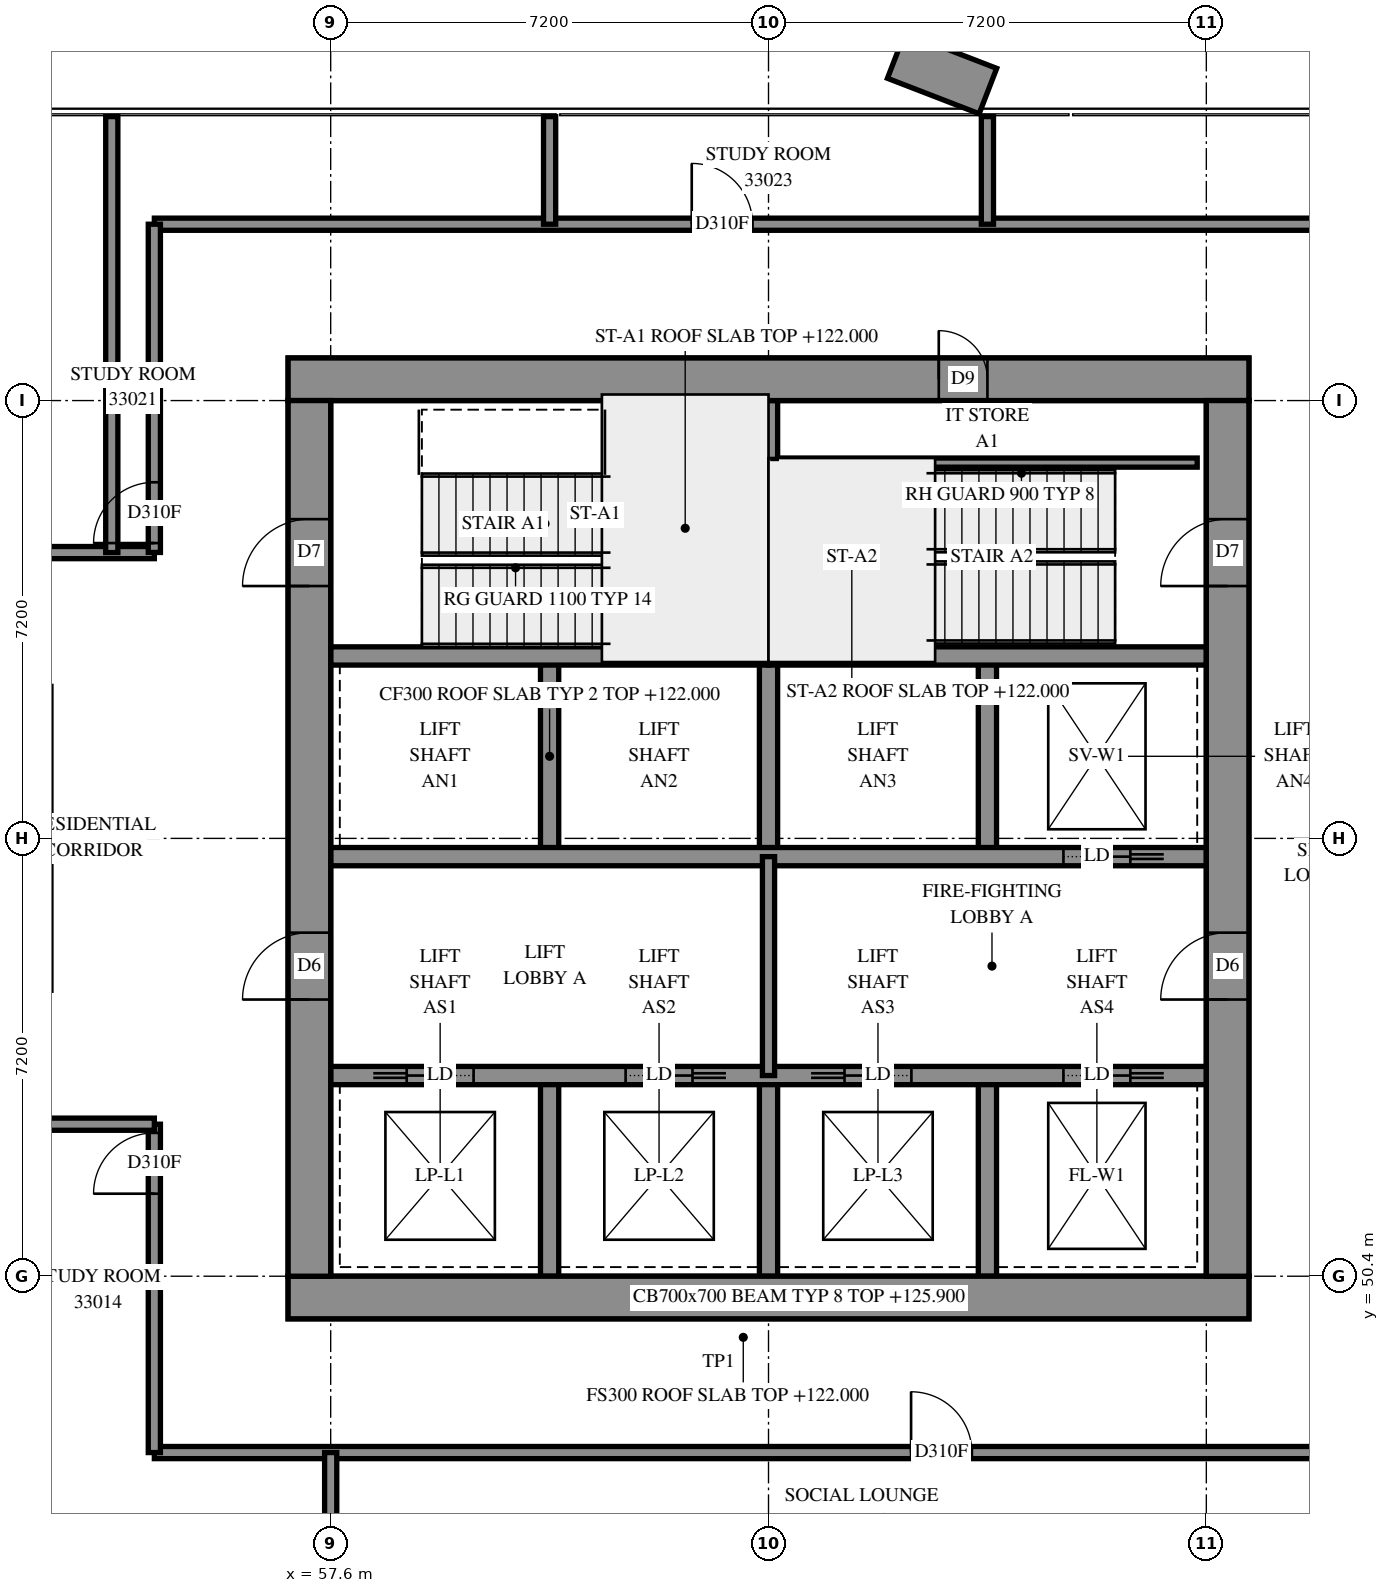
"""IFC4 building model, lengths in metres.
Left out: names, types, materials, properties, quantities, classifications, styles, units other than length and angle.
Written with IfcOpenShell. Run it as: python <this file> out.ifc"""

import sys

from ifc_helpers import new_model, si_unit, direction, frame, frame_2d, origin, place, context, subcontext, project, spatial, rectangle, extrude, element, fill, save


model = new_model("IFC4")
c1 = context("Model", 3, precision=1e-05, world=origin(), true_north=direction((0.0, 1.0)))
c2 = subcontext(c1, "Body", "Model", "MODEL_VIEW")
j1 = project(units=[si_unit("LENGTHUNIT", "METRE"), si_unit("PLANEANGLEUNIT", "RADIAN")], contexts=[c1])
p1 = place(None, origin())
s1 = spatial("IfcSite", under=j1, at=p1, CompositionType="ELEMENT")
p2 = place(p1, origin())
s2 = spatial("IfcBuilding", under=s1, at=p2, CompositionType="ELEMENT")
p3 = place(p2, frame((0.0, 0.0, 122.0)))
s3 = spatial("IfcBuildingStorey", under=s2, at=p3, CompositionType="ELEMENT", Elevation=122.0)
p4 = place(p3, frame((56.9, 50.05, -0.3), z_axis=(0.0, 0.0, 1.0), x_axis=(1.0, 0.0, 0.0)))
e1 = element("IfcWall", 1, at=p4, inside=s3, PredefinedType="SHEAR", context=c2, shape_type="SweptSolid", body=[
    extrude(rectangle(XDim=15.8, YDim=0.7, at=frame_2d((7.9, 0.0))), origin(), (0.0, 0.0, 1.0), 3.5),
])
p5 = place(p3, frame((56.9, 65.15, -0.3), z_axis=(0.0, 0.0, 1.0), x_axis=(1.0, 0.0, 0.0)))
e2 = element("IfcWall", 2, at=p5, inside=s3, PredefinedType="SHEAR", context=c2, shape_type="SweptSolid", body=[
    extrude(rectangle(XDim=15.8, YDim=0.7, at=frame_2d((7.9, 0.0))), origin(), (0.0, 0.0, 1.0), 3.5),
])
p6 = place(p5, frame((10.7, 0.0, 0.3)))
e3 = element("IfcOpeningElement", 3, at=p6, cuts=e2, PredefinedType="OPENING", context=c2, shape_type="SweptSolid", body=[
    extrude(rectangle(XDim=0.8, YDim=2.1, at=frame_2d((0.4, 1.05))), frame((0.0, 0.36, 0.0), z_axis=(0.0, -1.0, 0.0), x_axis=(1.0, 0.0, 0.0)), (0.0, 0.0, 1.0), 0.72),
])
p7 = place(p3, frame((57.25, 50.4, -0.3), z_axis=(0.0, 0.0, 1.0), x_axis=(0.0, 1.0, 0.0)))
e4 = element("IfcWall", 4, at=p7, inside=s3, PredefinedType="SHEAR", context=c2, shape_type="SweptSolid", body=[
    extrude(rectangle(XDim=14.4, YDim=0.7, at=frame_2d((7.2, 0.0))), origin(), (0.0, 0.0, 1.0), 3.5),
])
p8 = place(p7, frame((4.55, 0.0, 0.3)))
e5 = element("IfcOpeningElement", 5, at=p8, cuts=e4, PredefinedType="OPENING", context=c2, shape_type="SweptSolid", body=[
    extrude(rectangle(XDim=1.1, YDim=2.1, at=frame_2d((0.55, 1.05))), frame((0.0, 0.36, 0.0), z_axis=(0.0, -1.0, 0.0), x_axis=(1.0, 0.0, 0.0)), (0.0, 0.0, 1.0), 0.72),
])
p9 = place(p7, frame((11.35, 0.0, 0.3)))
e6 = element("IfcOpeningElement", 6, at=p9, cuts=e4, PredefinedType="OPENING", context=c2, shape_type="SweptSolid", body=[
    extrude(rectangle(XDim=1.1, YDim=2.1, at=frame_2d((0.55, 1.05))), frame((0.0, 0.36, 0.0), z_axis=(0.0, -1.0, 0.0), x_axis=(1.0, 0.0, 0.0)), (0.0, 0.0, 1.0), 0.72),
])
p10 = place(p3, frame((72.35, 50.4, -0.3), z_axis=(0.0, 0.0, 1.0), x_axis=(0.0, 1.0, 0.0)))
e7 = element("IfcWall", 7, at=p10, inside=s3, PredefinedType="SHEAR", context=c2, shape_type="SweptSolid", body=[
    extrude(rectangle(XDim=14.4, YDim=0.7, at=frame_2d((7.2, 0.0))), origin(), (0.0, 0.0, 1.0), 3.5),
])
p11 = place(p10, frame((4.55, 0.0, 0.3)))
e8 = element("IfcOpeningElement", 8, at=p11, cuts=e7, PredefinedType="OPENING", context=c2, shape_type="SweptSolid", body=[
    extrude(rectangle(XDim=1.1, YDim=2.1, at=frame_2d((0.55, 1.05))), frame((0.0, 0.36, 0.0), z_axis=(0.0, -1.0, 0.0), x_axis=(1.0, 0.0, 0.0)), (0.0, 0.0, 1.0), 0.72),
])
p12 = place(p10, frame((11.35, 0.0, 0.3)))
e9 = element("IfcOpeningElement", 9, at=p12, cuts=e7, PredefinedType="OPENING", context=c2, shape_type="SweptSolid", body=[
    extrude(rectangle(XDim=1.1, YDim=2.1, at=frame_2d((0.55, 1.05))), frame((0.0, 0.36, 0.0), z_axis=(0.0, -1.0, 0.0), x_axis=(1.0, 0.0, 0.0)), (0.0, 0.0, 1.0), 0.72),
])
for number, where, z_axis, x_axis in (
    (10, (61.2, 50.4, 0.0), (0.0, 0.0, 1.0), (0.0, 1.0, 0.0)),
    (11, (61.2, 57.3, 0.0), (0.0, 0.0, 1.0), (0.0, 1.0, 0.0)),
    (12, (64.8, 50.4, 0.0), (0.0, 0.0, 1.0), (0.0, 1.0, 0.0)),
    (13, (64.8, 57.3, 0.0), (0.0, 0.0, 1.0), (0.0, 1.0, 0.0)),
    (14, (68.4, 50.4, 0.0), (0.0, 0.0, 1.0), (0.0, 1.0, 0.0)),
    (15, (68.4, 57.3, 0.0), (0.0, 0.0, 1.0), (0.0, 1.0, 0.0)),
):
    element("IfcWall", number, at=place(p3, frame(where, z_axis=z_axis, x_axis=x_axis)), inside=s3, PredefinedType="SOLIDWALL", context=c2, shape_type="SweptSolid", body=[
        extrude(rectangle(XDim=3.3, YDim=0.3, at=frame_2d((1.65, 0.0))), origin(), (0.0, 0.0, 1.0), 3.9),
    ])
p13 = place(p3, frame((57.6, 53.7, 0.0), z_axis=(0.0, 0.0, 1.0), x_axis=(1.0, 0.0, 0.0)))
e16 = element("IfcWall", 16, at=p13, inside=s3, PredefinedType="SOLIDWALL", context=c2, shape_type="SweptSolid", body=[
    extrude(rectangle(XDim=14.4, YDim=0.3, at=frame_2d((7.2, 0.0))), origin(), (0.0, 0.0, 1.0), 3.9),
])
p14 = place(p13, frame((1.25, 0.0, 0.0)))
e17 = element("IfcOpeningElement", 17, at=p14, cuts=e16, PredefinedType="OPENING", context=c2, shape_type="SweptSolid", body=[
    extrude(rectangle(XDim=1.1, YDim=2.1, at=frame_2d((0.55, 1.05))), frame((0.0, 0.16, 0.0), z_axis=(0.0, -1.0, 0.0), x_axis=(1.0, 0.0, 0.0)), (0.0, 0.0, 1.0), 0.32),
])
p15 = place(p13, frame((4.85, 0.0, 0.0)))
e18 = element("IfcOpeningElement", 18, at=p15, cuts=e16, PredefinedType="OPENING", context=c2, shape_type="SweptSolid", body=[
    extrude(rectangle(XDim=1.1, YDim=2.1, at=frame_2d((0.55, 1.05))), frame((0.0, 0.16, 0.0), z_axis=(0.0, -1.0, 0.0), x_axis=(1.0, 0.0, 0.0)), (0.0, 0.0, 1.0), 0.32),
])
p16 = place(p13, frame((8.45, 0.0, 0.0)))
e19 = element("IfcOpeningElement", 19, at=p16, cuts=e16, PredefinedType="OPENING", context=c2, shape_type="SweptSolid", body=[
    extrude(rectangle(XDim=1.1, YDim=2.1, at=frame_2d((0.55, 1.05))), frame((0.0, 0.16, 0.0), z_axis=(0.0, -1.0, 0.0), x_axis=(1.0, 0.0, 0.0)), (0.0, 0.0, 1.0), 0.32),
])
p17 = place(p13, frame((12.05, 0.0, 0.0)))
e20 = element("IfcOpeningElement", 20, at=p17, cuts=e16, PredefinedType="OPENING", context=c2, shape_type="SweptSolid", body=[
    extrude(rectangle(XDim=1.1, YDim=2.1, at=frame_2d((0.55, 1.05))), frame((0.0, 0.16, 0.0), z_axis=(0.0, -1.0, 0.0), x_axis=(1.0, 0.0, 0.0)), (0.0, 0.0, 1.0), 0.32),
])
p18 = place(p3, frame((57.6, 57.3, 0.0), z_axis=(0.0, 0.0, 1.0), x_axis=(1.0, 0.0, 0.0)))
e21 = element("IfcWall", 21, at=p18, inside=s3, PredefinedType="SOLIDWALL", context=c2, shape_type="SweptSolid", body=[
    extrude(rectangle(XDim=14.4, YDim=0.3, at=frame_2d((7.2, 0.0))), origin(), (0.0, 0.0, 1.0), 3.9),
])
p19 = place(p18, frame((12.05, 0.0, 0.0)))
e22 = element("IfcOpeningElement", 22, at=p19, cuts=e21, PredefinedType="OPENING", context=c2, shape_type="SweptSolid", body=[
    extrude(rectangle(XDim=1.1, YDim=2.1, at=frame_2d((0.55, 1.05))), frame((0.0, 0.16, 0.0), z_axis=(0.0, -1.0, 0.0), x_axis=(1.0, 0.0, 0.0)), (0.0, 0.0, 1.0), 0.32),
])
for number, where, z_axis, x_axis in (
    (23, (57.6, 60.6, 0.0), (0.0, 0.0, 1.0), (1.0, 0.0, 0.0)),
    (24, (64.8, 60.6, 0.0), (0.0, 0.0, 1.0), (1.0, 0.0, 0.0)),
):
    element("IfcWall", number, at=place(p3, frame(where, z_axis=z_axis, x_axis=x_axis)), inside=s3, PredefinedType="SOLIDWALL", context=c2, shape_type="SweptSolid", body=[
        extrude(rectangle(XDim=7.2, YDim=0.3, at=frame_2d((3.6, 0.0))), origin(), (0.0, 0.0, 1.0), 3.9),
    ])
p20 = place(p3, frame((64.8, 60.6, 0.0), z_axis=(0.0, 0.0, 1.0), x_axis=(0.0, 1.0, 0.0)))
e25 = element("IfcWall", 25, at=p20, inside=s3, PredefinedType="SOLIDWALL", context=c2, shape_type="SweptSolid", body=[
    extrude(rectangle(XDim=4.2, YDim=0.3, at=frame_2d((2.1, 0.0))), origin(), (0.0, 0.0, 1.0), 3.9),
])
p21 = place(p3, frame((68.408, 69.89, 0.0), z_axis=(0.0, 0.0, 1.0), x_axis=(-0.9327962444, 0.3604041708, 0.0)))
e26 = element("IfcWall", 26, at=p21, inside=s3, PredefinedType="SOLIDWALL", context=c2, shape_type="SweptSolid", body=[
    extrude(rectangle(XDim=1.617, YDim=0.8, at=frame_2d((0.808, 0.0))), origin(), (0.0, 0.0, 1.0), 0.65),
])
p22 = place(p3, frame((64.95, 63.78, 0.0), z_axis=(0.0, 0.0, 1.0), x_axis=(1.0, 0.0, 0.0)))
e27 = element("IfcWall", 27, at=p22, inside=s3, PredefinedType="PARTITIONING", context=c2, shape_type="SweptSolid", body=[
    extrude(rectangle(XDim=6.9, YDim=0.15, at=frame_2d((3.45, 0.0))), origin(), (0.0, 0.0, 1.0), 3.9),
])
p23 = place(p3, frame((64.8, 53.7, 0.0), z_axis=(0.0, 0.0, 1.0), x_axis=(0.0, 1.0, 0.0)))
e28 = element("IfcWall", 28, at=p23, inside=s3, PredefinedType="PARTITIONING", context=c2, shape_type="SweptSolid", body=[
    extrude(rectangle(XDim=3.6, YDim=0.2, at=frame_2d((1.8, 0.0))), origin(), (0.0, 0.0, 1.0), 3.9),
])
p24 = place(p3, frame((33.502, 62.3, 0.0), z_axis=(0.0, 0.0, 1.0), x_axis=(1.0, 0.0, 0.0)))
e29 = element("IfcWall", 29, at=p24, inside=s3, PredefinedType="PARTITIONING", context=c2, shape_type="SweptSolid", body=[
    extrude(rectangle(XDim=21.198, YDim=0.2, at=frame_2d((10.599, 0.0))), origin(), (0.0, 0.0, 1.0), 3.9),
])
p25 = place(p24, frame((6.056, 0.0, 0.0)))
e30 = element("IfcOpeningElement", 30, at=p25, cuts=e29, PredefinedType="OPENING", context=c2, shape_type="SweptSolid", body=[
    extrude(rectangle(XDim=1.0, YDim=2.1, at=frame_2d((0.5, 1.05))), frame((0.0, 0.11, 0.0), z_axis=(0.0, -1.0, 0.0), x_axis=(1.0, 0.0, 0.0)), (0.0, 0.0, 1.0), 0.22),
])
p26 = place(p24, frame((11.463, 0.0, 0.0)))
e31 = element("IfcOpeningElement", 31, at=p26, cuts=e29, PredefinedType="OPENING", context=c2, shape_type="SweptSolid", body=[
    extrude(rectangle(XDim=1.0, YDim=2.1, at=frame_2d((0.5, 1.05))), frame((0.0, 0.11, 0.0), z_axis=(0.0, -1.0, 0.0), x_axis=(1.0, 0.0, 0.0)), (0.0, 0.0, 1.0), 0.22),
])
p27 = place(p24, frame((15.636, 0.0, 0.0)))
e32 = element("IfcOpeningElement", 32, at=p27, cuts=e29, PredefinedType="OPENING", context=c2, shape_type="SweptSolid", body=[
    extrude(rectangle(XDim=1.0, YDim=2.1, at=frame_2d((0.5, 1.05))), frame((0.0, 0.11, 0.0), z_axis=(0.0, -1.0, 0.0), x_axis=(1.0, 0.0, 0.0)), (0.0, 0.0, 1.0), 0.22),
])
p28 = place(p3, frame((54.7, 67.7, 0.0), z_axis=(0.0, 0.0, 1.0), x_axis=(1.0, 0.0, 0.0)))
e33 = element("IfcWall", 33, at=p28, inside=s3, PredefinedType="PARTITIONING", context=c2, shape_type="SweptSolid", body=[
    extrude(rectangle(XDim=20.2, YDim=0.2, at=frame_2d((10.1, 0.0))), origin(), (0.0, 0.0, 1.0), 3.9),
])
p29 = place(p28, frame((8.838, 0.0, 0.0)))
e34 = element("IfcOpeningElement", 34, at=p29, cuts=e33, PredefinedType="OPENING", context=c2, shape_type="SweptSolid", body=[
    extrude(rectangle(XDim=1.0, YDim=2.1, at=frame_2d((0.5, 1.05))), frame((0.0, 0.11, 0.0), z_axis=(0.0, -1.0, 0.0), x_axis=(1.0, 0.0, 0.0)), (0.0, 0.0, 1.0), 0.22),
])
p30 = place(p3, frame((54.7, 47.5, 0.0), z_axis=(0.0, 0.0, 1.0), x_axis=(1.0, 0.0, 0.0)))
e35 = element("IfcWall", 35, at=p30, inside=s3, PredefinedType="PARTITIONING", context=c2, shape_type="SweptSolid", body=[
    extrude(rectangle(XDim=19.442, YDim=0.2, at=frame_2d((9.721, 0.0))), origin(), (0.0, 0.0, 1.0), 3.9),
])
p31 = place(p30, frame((12.444, 0.0, 0.0)))
e36 = element("IfcOpeningElement", 36, at=p31, cuts=e35, PredefinedType="OPENING", context=c2, shape_type="SweptSolid", body=[
    extrude(rectangle(XDim=1.0, YDim=2.1, at=frame_2d((0.5, 1.05))), frame((0.0, 0.11, 0.0), z_axis=(0.0, -1.0, 0.0), x_axis=(1.0, 0.0, 0.0)), (0.0, 0.0, 1.0), 0.22),
])
p32 = place(p3, frame((54.0, 62.3, 0.0), z_axis=(0.0, 0.0, 1.0), x_axis=(0.0, 1.0, 0.0)))
e37 = element("IfcWall", 37, at=p32, inside=s3, PredefinedType="PARTITIONING", context=c2, shape_type="SweptSolid", body=[
    extrude(rectangle(XDim=7.17, YDim=0.2, at=frame_2d((3.585, 0.0))), origin(), (0.0, 0.0, 1.0), 3.9),
])
p33 = place(p3, frame((54.7, 47.5, 0.0), z_axis=(0.0, 0.0, 1.0), x_axis=(0.0, 1.0, 0.0)))
e38 = element("IfcWall", 38, at=p33, inside=s3, PredefinedType="PARTITIONING", context=c2, shape_type="SweptSolid", body=[
    extrude(rectangle(XDim=5.4, YDim=0.2, at=frame_2d((2.7, 0.0))), origin(), (0.0, 0.0, 1.0), 3.9),
])
p34 = place(p33, frame((4.257, 0.0, 0.0)))
e39 = element("IfcOpeningElement", 39, at=p34, cuts=e38, PredefinedType="OPENING", context=c2, shape_type="SweptSolid", body=[
    extrude(rectangle(XDim=1.0, YDim=2.1, at=frame_2d((0.5, 1.05))), frame((0.0, 0.11, 0.0), z_axis=(0.0, -1.0, 0.0), x_axis=(1.0, 0.0, 0.0)), (0.0, 0.0, 1.0), 0.22),
])
p35 = place(p3, frame((54.7, 62.302, 0.0), z_axis=(0.0, 0.0, 1.0), x_axis=(0.0, 1.0, 0.0)))
e40 = element("IfcWall", 40, at=p35, inside=s3, PredefinedType="PARTITIONING", context=c2, shape_type="SweptSolid", body=[
    extrude(rectangle(XDim=5.398, YDim=0.2, at=frame_2d((2.699, 0.0))), origin(), (0.0, 0.0, 1.0), 3.9),
])
p36 = place(p35, frame((0.154, 0.0, 0.0)))
e41 = element("IfcOpeningElement", 41, at=p36, cuts=e40, PredefinedType="OPENING", context=c2, shape_type="SweptSolid", body=[
    extrude(rectangle(XDim=1.0, YDim=2.1, at=frame_2d((0.5, 1.05))), frame((0.0, 0.11, 0.0), z_axis=(0.0, -1.0, 0.0), x_axis=(1.0, 0.0, 0.0)), (0.0, 0.0, 1.0), 0.22),
])
p37 = place(p3, frame((52.912, 52.9, 0.0), z_axis=(0.0, 0.0, 1.0), x_axis=(1.0, 0.0, 0.0)))
e42 = element("IfcWall", 42, at=p37, inside=s3, PredefinedType="PARTITIONING", context=c2, shape_type="SweptSolid", body=[
    extrude(rectangle(XDim=1.788, YDim=0.2, at=frame_2d((0.894, 0.0))), origin(), (0.0, 0.0, 1.0), 3.9),
])
for number, where, z_axis, x_axis in (
    (43, (57.6, 45.73, 0.0), (0.0, 0.0, 1.0), (0.0, 1.0, 0.0)),
    (44, (61.2, 67.7, 0.0), (0.0, 0.0, 1.0), (0.0, 1.0, 0.0)),
    (45, (68.4, 67.7, 0.0), (0.0, 0.0, 1.0), (0.0, 1.0, 0.0)),
):
    element("IfcWall", number, at=place(p3, frame(where, z_axis=z_axis, x_axis=x_axis)), inside=s3, PredefinedType="PARTITIONING", context=c2, shape_type="SweptSolid", body=[
        extrude(rectangle(XDim=1.77, YDim=0.2, at=frame_2d((0.885, 0.0))), origin(), (0.0, 0.0, 1.0), 3.9),
    ])
p38 = place(p6, origin())
e46 = element("IfcDoor", 46, at=p38, inside=s3, OperationType="SINGLE_SWING_RIGHT", PredefinedType="DOOR", context=c2, shape_type="SweptSolid", body=[
    extrude(rectangle(XDim=0.8, YDim=2.1, at=frame_2d((0.4, 1.05))), frame((0.0, -0.29, 0.0), z_axis=(0.0, -1.0, 0.0), x_axis=(1.0, 0.0, 0.0)), (0.0, 0.0, 1.0), 0.05),
])
fill(e3, e46)
p39 = place(p8, origin())
e47 = element("IfcDoor", 47, at=p39, inside=s3, OperationType="DOUBLE_DOOR_SINGLE_SWING", PredefinedType="DOOR", context=c2, shape_type="SweptSolid", body=[
    extrude(rectangle(XDim=1.1, YDim=2.1, at=frame_2d((0.55, 1.05))), frame((0.0, 0.025, 0.0), z_axis=(0.0, -1.0, 0.0), x_axis=(1.0, 0.0, 0.0)), (0.0, 0.0, 1.0), 0.05),
])
fill(e5, e47)
p40 = place(p11, origin())
e48 = element("IfcDoor", 48, at=p40, inside=s3, OperationType="DOUBLE_DOOR_SINGLE_SWING", PredefinedType="DOOR", context=c2, shape_type="SweptSolid", body=[
    extrude(rectangle(XDim=1.1, YDim=2.1, at=frame_2d((0.55, 1.05))), frame((0.0, 0.025, 0.0), z_axis=(0.0, -1.0, 0.0), x_axis=(1.0, 0.0, 0.0)), (0.0, 0.0, 1.0), 0.05),
])
fill(e8, e48)
p41 = place(p9, origin())
e49 = element("IfcDoor", 49, at=p41, inside=s3, OperationType="SINGLE_SWING_LEFT", PredefinedType="DOOR", context=c2, shape_type="SweptSolid", body=[
    extrude(rectangle(XDim=1.1, YDim=2.1, at=frame_2d((0.55, 1.05))), frame((0.0, 0.025, 0.0), z_axis=(0.0, -1.0, 0.0), x_axis=(1.0, 0.0, 0.0)), (0.0, 0.0, 1.0), 0.05),
])
fill(e6, e49)
p42 = place(p12, origin())
e50 = element("IfcDoor", 50, at=p42, inside=s3, OperationType="SINGLE_SWING_RIGHT", PredefinedType="DOOR", context=c2, shape_type="SweptSolid", body=[
    extrude(rectangle(XDim=1.1, YDim=2.1, at=frame_2d((0.55, 1.05))), frame((0.0, 0.025, 0.0), z_axis=(0.0, -1.0, 0.0), x_axis=(1.0, 0.0, 0.0)), (0.0, 0.0, 1.0), 0.05),
])
fill(e9, e50)
p43 = place(p14, origin())
e51 = element("IfcDoor", 51, at=p43, inside=s3, OperationType="SLIDING_TO_LEFT", PredefinedType="DOOR", context=c2, shape_type="SweptSolid", body=[
    extrude(rectangle(XDim=1.1, YDim=2.1, at=frame_2d((0.55, 1.05))), frame((0.0, 0.025, 0.0), z_axis=(0.0, -1.0, 0.0), x_axis=(1.0, 0.0, 0.0)), (0.0, 0.0, 1.0), 0.05),
])
fill(e17, e51)
p44 = place(p15, origin())
e52 = element("IfcDoor", 52, at=p44, inside=s3, OperationType="SLIDING_TO_RIGHT", PredefinedType="DOOR", context=c2, shape_type="SweptSolid", body=[
    extrude(rectangle(XDim=1.1, YDim=2.1, at=frame_2d((0.55, 1.05))), frame((0.0, 0.025, 0.0), z_axis=(0.0, -1.0, 0.0), x_axis=(1.0, 0.0, 0.0)), (0.0, 0.0, 1.0), 0.05),
])
fill(e18, e52)
p45 = place(p16, origin())
e53 = element("IfcDoor", 53, at=p45, inside=s3, OperationType="SLIDING_TO_LEFT", PredefinedType="DOOR", context=c2, shape_type="SweptSolid", body=[
    extrude(rectangle(XDim=1.1, YDim=2.1, at=frame_2d((0.55, 1.05))), frame((0.0, 0.025, 0.0), z_axis=(0.0, -1.0, 0.0), x_axis=(1.0, 0.0, 0.0)), (0.0, 0.0, 1.0), 0.05),
])
fill(e19, e53)
p46 = place(p17, origin())
e54 = element("IfcDoor", 54, at=p46, inside=s3, OperationType="SLIDING_TO_RIGHT", PredefinedType="DOOR", context=c2, shape_type="SweptSolid", body=[
    extrude(rectangle(XDim=1.1, YDim=2.1, at=frame_2d((0.55, 1.05))), frame((0.0, 0.025, 0.0), z_axis=(0.0, -1.0, 0.0), x_axis=(1.0, 0.0, 0.0)), (0.0, 0.0, 1.0), 0.05),
])
fill(e20, e54)
p47 = place(p19, origin())
e55 = element("IfcDoor", 55, at=p47, inside=s3, OperationType="SLIDING_TO_RIGHT", PredefinedType="DOOR", context=c2, shape_type="SweptSolid", body=[
    extrude(rectangle(XDim=1.1, YDim=2.1, at=frame_2d((0.55, 1.05))), frame((0.0, 0.025, 0.0), z_axis=(0.0, -1.0, 0.0), x_axis=(1.0, 0.0, 0.0)), (0.0, 0.0, 1.0), 0.05),
])
fill(e22, e55)
p48 = place(p34, origin())
e56 = element("IfcDoor", 56, at=p48, inside=s3, OperationType="SINGLE_SWING_LEFT", PredefinedType="DOOR", context=c2, shape_type="SweptSolid", body=[
    extrude(rectangle(XDim=1.0, YDim=2.1, at=frame_2d((0.5, 1.05))), frame((0.0, 0.025, 0.0), z_axis=(0.0, -1.0, 0.0), x_axis=(1.0, 0.0, 0.0)), (0.0, 0.0, 1.0), 0.05),
])
fill(e39, e56)
p49 = place(p31, origin())
e57 = element("IfcDoor", 57, at=p49, inside=s3, OperationType="SINGLE_SWING_LEFT", PredefinedType="DOOR", context=c2, shape_type="SweptSolid", body=[
    extrude(rectangle(XDim=1.0, YDim=2.1, at=frame_2d((0.5, 1.05))), frame((0.0, 0.025, 0.0), z_axis=(0.0, -1.0, 0.0), x_axis=(1.0, 0.0, 0.0)), (0.0, 0.0, 1.0), 0.05),
])
fill(e36, e57)
p50 = place(p36, origin())
e58 = element("IfcDoor", 58, at=p50, inside=s3, OperationType="SINGLE_SWING_LEFT", PredefinedType="DOOR", context=c2, shape_type="SweptSolid", body=[
    extrude(rectangle(XDim=1.0, YDim=2.1, at=frame_2d((0.5, 1.05))), frame((0.0, 0.025, 0.0), z_axis=(0.0, -1.0, 0.0), x_axis=(1.0, 0.0, 0.0)), (0.0, 0.0, 1.0), 0.05),
])
fill(e41, e58)
p51 = place(p29, origin())
e59 = element("IfcDoor", 59, at=p51, inside=s3, OperationType="SINGLE_SWING_LEFT", PredefinedType="DOOR", context=c2, shape_type="SweptSolid", body=[
    extrude(rectangle(XDim=1.0, YDim=2.1, at=frame_2d((0.5, 1.05))), frame((0.0, 0.025, 0.0), z_axis=(0.0, -1.0, 0.0), x_axis=(1.0, 0.0, 0.0)), (0.0, 0.0, 1.0), 0.05),
])
fill(e34, e59)
save(model, sys.argv[1])
